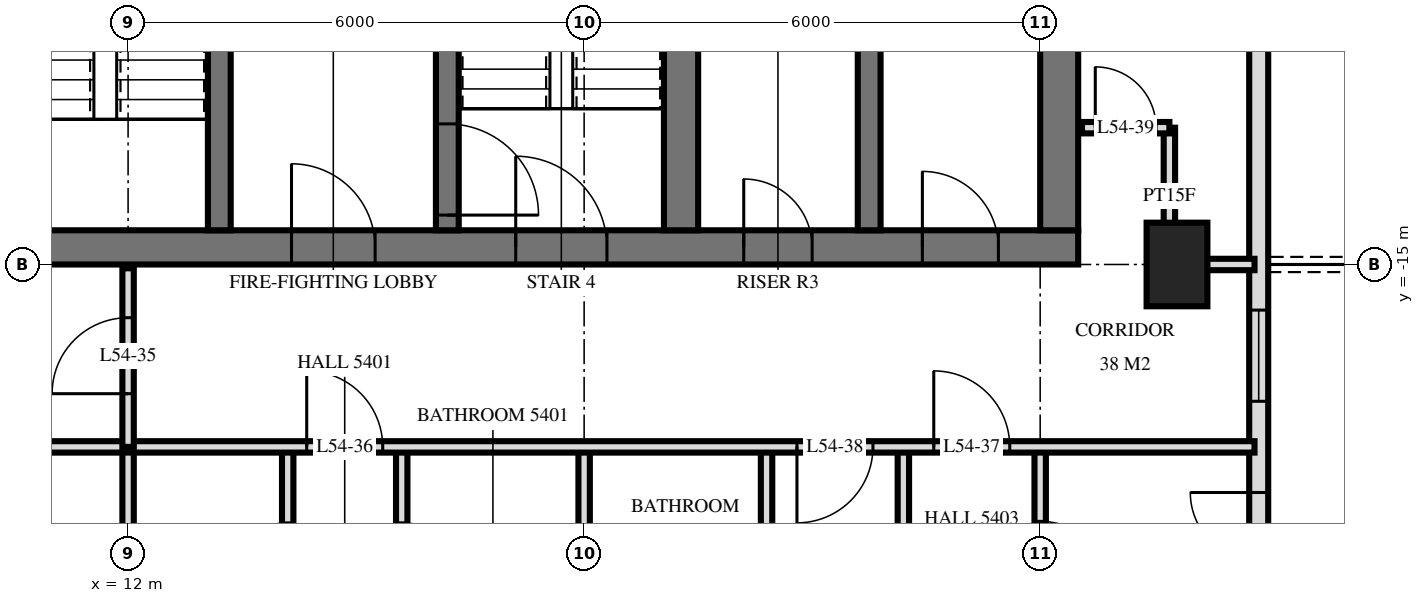
"""IFC4 building model, lengths in metres.
Left out: names, types, materials, properties, quantities, classifications, styles, units other than length and angle.
Written with IfcOpenShell. Run it as: python <this file> out.ifc"""

import sys

from ifc_helpers import new_model, si_unit, direction, frame, frame_2d, origin, origin_2d, place, context, subcontext, project, spatial, rectangle, extrude, element, fill, save


model = new_model("IFC4")
c1 = context("Model", 3, precision=1e-05, world=origin(), true_north=direction((0.0, 1.0)))
c2 = subcontext(c1, "Body", "Model", "MODEL_VIEW")
j1 = project(units=[si_unit("LENGTHUNIT", "METRE"), si_unit("PLANEANGLEUNIT", "RADIAN")], contexts=[c1])
p1 = place(None, origin())
s1 = spatial("IfcSite", under=j1, at=p1, CompositionType="ELEMENT")
p2 = place(p1, origin())
s2 = spatial("IfcBuilding", under=s1, at=p2, CompositionType="ELEMENT")
p3 = place(p2, frame((0.0, 0.0, 208.1)))
s3 = spatial("IfcBuildingStorey", under=s2, at=p3, CompositionType="ELEMENT", Elevation=208.1)
p4 = place(p3, frame((25.8, -15.0, 0.0), z_axis=(0.0, 0.0, 1.0), x_axis=(0.0, 1.0, 0.0)))
e1 = element("IfcColumn", 1, at=p4, inside=s3, PredefinedType="COLUMN", context=c2, shape_type="SweptSolid", body=[
    extrude(rectangle(XDim=1.1, YDim=0.8, at=origin_2d()), origin(), (0.0, 0.0, 1.0), 3.5),
])
p5 = place(p3, frame((10.0, -14.775, 0.0), z_axis=(0.0, 0.0, 1.0), x_axis=(1.0, 0.0, 0.0)))
e2 = element("IfcWall", 2, at=p5, inside=s3, PredefinedType="SHEAR", context=c2, shape_type="SweptSolid", body=[
    extrude(rectangle(XDim=14.5, YDim=0.45, at=frame_2d((7.25, 0.0))), origin(), (0.0, 0.0, 1.0), 3.5),
])
p6 = place(p5, frame((7.1, 0.0, 0.0)))
e3 = element("IfcOpeningElement", 3, at=p6, cuts=e2, PredefinedType="OPENING", context=c2, shape_type="SweptSolid", body=[
    extrude(rectangle(XDim=1.2, YDim=2.1, at=frame_2d((0.6, 1.05))), frame((0.0, 0.235, 0.0), z_axis=(0.0, -1.0, 0.0), x_axis=(1.0, 0.0, 0.0)), (0.0, 0.0, 1.0), 0.47),
])
p7 = place(p5, frame((4.15, 0.0, 0.0)))
e4 = element("IfcOpeningElement", 4, at=p7, cuts=e2, PredefinedType="OPENING", context=c2, shape_type="SweptSolid", body=[
    extrude(rectangle(XDim=1.1, YDim=2.1, at=frame_2d((0.55, 1.05))), frame((0.0, 0.235, 0.0), z_axis=(0.0, -1.0, 0.0), x_axis=(1.0, 0.0, 0.0)), (0.0, 0.0, 1.0), 0.47),
])
p8 = place(p5, frame((10.1, 0.0, 0.0)))
e5 = element("IfcOpeningElement", 5, at=p8, cuts=e2, PredefinedType="OPENING", context=c2, shape_type="SweptSolid", body=[
    extrude(rectangle(XDim=0.9, YDim=2.1, at=frame_2d((0.45, 1.05))), frame((0.0, 0.235, 0.0), z_axis=(0.0, -1.0, 0.0), x_axis=(1.0, 0.0, 0.0)), (0.0, 0.0, 1.0), 0.47),
])
p9 = place(p5, frame((12.45, 0.0, 0.0)))
e6 = element("IfcOpeningElement", 6, at=p9, cuts=e2, PredefinedType="OPENING", context=c2, shape_type="SweptSolid", body=[
    extrude(rectangle(XDim=1.0, YDim=2.1, at=frame_2d((0.5, 1.05))), frame((0.0, 0.235, 0.0), z_axis=(0.0, -1.0, 0.0), x_axis=(1.0, 0.0, 0.0)), (0.0, 0.0, 1.0), 0.47),
])
p10 = place(p3, frame((24.25, -14.55, 0.0), z_axis=(0.0, 0.0, 1.0), x_axis=(0.0, 1.0, 0.0)))
e7 = element("IfcWall", 7, at=p10, inside=s3, PredefinedType="SHEAR", context=c2, shape_type="SweptSolid", body=[
    extrude(rectangle(XDim=14.1, YDim=0.5, at=frame_2d((7.05, 0.0))), origin(), (0.0, 0.0, 1.0), 3.5),
])
p11 = place(p3, frame((13.2, -14.55, 0.0), z_axis=(0.0, 0.0, 1.0), x_axis=(0.0, 1.0, 0.0)))
e8 = element("IfcWall", 8, at=p11, inside=s3, PredefinedType="SHEAR", context=c2, shape_type="SweptSolid", body=[
    extrude(rectangle(XDim=5.4, YDim=0.3, at=frame_2d((2.7, 0.0))), origin(), (0.0, 0.0, 1.0), 3.5),
])
p12 = place(p11, frame((4.0, 0.0, 0.0)))
e9 = element("IfcOpeningElement", 9, at=p12, cuts=e8, PredefinedType="OPENING", context=c2, shape_type="SweptSolid", body=[
    extrude(rectangle(XDim=1.2, YDim=2.1, at=frame_2d((0.6, 1.05))), frame((0.0, 0.16, 0.0), z_axis=(0.0, -1.0, 0.0), x_axis=(1.0, 0.0, 0.0)), (0.0, 0.0, 1.0), 0.32),
])
p13 = place(p3, frame((16.2, -14.55, 0.0), z_axis=(0.0, 0.0, 1.0), x_axis=(0.0, 1.0, 0.0)))
e10 = element("IfcWall", 10, at=p13, inside=s3, PredefinedType="SHEAR", context=c2, shape_type="SweptSolid", body=[
    extrude(rectangle(XDim=5.4, YDim=0.3, at=frame_2d((2.7, 0.0))), origin(), (0.0, 0.0, 1.0), 3.5),
])
p14 = place(p13, frame((0.2, 0.0, 0.0)))
e11 = element("IfcOpeningElement", 11, at=p14, cuts=e10, PredefinedType="OPENING", context=c2, shape_type="SweptSolid", body=[
    extrude(rectangle(XDim=1.2, YDim=2.1, at=frame_2d((0.6, 1.05))), frame((0.0, 0.16, 0.0), z_axis=(0.0, -1.0, 0.0), x_axis=(1.0, 0.0, 0.0)), (0.0, 0.0, 1.0), 0.32),
])
p15 = place(p3, frame((19.275, -14.55, 0.0), z_axis=(0.0, 0.0, 1.0), x_axis=(0.0, 1.0, 0.0)))
e12 = element("IfcWall", 12, at=p15, inside=s3, PredefinedType="SHEAR", context=c2, shape_type="SweptSolid", body=[
    extrude(rectangle(XDim=5.4, YDim=0.45, at=frame_2d((2.7, 0.0))), origin(), (0.0, 0.0, 1.0), 3.5),
])
p16 = place(p3, frame((21.75, -14.55, 0.0), z_axis=(0.0, 0.0, 1.0), x_axis=(0.0, 1.0, 0.0)))
e13 = element("IfcWall", 13, at=p16, inside=s3, PredefinedType="SHEAR", context=c2, shape_type="SweptSolid", body=[
    extrude(rectangle(XDim=5.4, YDim=0.3, at=frame_2d((2.7, 0.0))), origin(), (0.0, 0.0, 1.0), 3.5),
])
p17 = place(p3, frame((26.875, -24.875, 0.0), z_axis=(0.0, 0.0, 1.0), x_axis=(0.0, 1.0, 0.0)))
e14 = element("IfcWall", 14, at=p17, inside=s3, PredefinedType="SOLIDWALL", context=c2, shape_type="SweptSolid", body=[
    extrude(rectangle(XDim=21.551, YDim=0.25, at=frame_2d((10.775, 0.0))), origin(), (0.0, 0.0, 1.0), 3.22),
])
p18 = place(p17, frame((0.575, 0.0, 0.0)))
e15 = element("IfcOpeningElement", 15, at=p18, cuts=e14, PredefinedType="OPENING", context=c2, shape_type="SweptSolid", body=[
    extrude(rectangle(XDim=1.8, YDim=2.4, at=frame_2d((0.9, 1.2))), frame((0.0, 0.135, 0.0), z_axis=(0.0, -1.0, 0.0), x_axis=(1.0, 0.0, 0.0)), (0.0, 0.0, 1.0), 0.27),
])
p19 = place(p17, frame((5.075, 0.0, 0.0)))
e16 = element("IfcOpeningElement", 16, at=p19, cuts=e14, PredefinedType="OPENING", context=c2, shape_type="SweptSolid", body=[
    extrude(rectangle(XDim=1.8, YDim=2.4, at=frame_2d((0.9, 1.2))), frame((0.0, 0.135, 0.0), z_axis=(0.0, -1.0, 0.0), x_axis=(1.0, 0.0, 0.0)), (0.0, 0.0, 1.0), 0.27),
])
p20 = place(p17, frame((8.075, 0.0, 0.9)))
e17 = element("IfcOpeningElement", 17, at=p20, cuts=e14, PredefinedType="OPENING", context=c2, shape_type="SweptSolid", body=[
    extrude(rectangle(XDim=1.2, YDim=1.5, at=frame_2d((0.6, 0.75))), frame((0.0, 0.135, 0.0), z_axis=(0.0, -1.0, 0.0), x_axis=(1.0, 0.0, 0.0)), (0.0, 0.0, 1.0), 0.27),
])
p21 = place(p17, frame((13.1, 0.0, 0.0)))
e18 = element("IfcOpeningElement", 18, at=p21, cuts=e14, PredefinedType="OPENING", context=c2, shape_type="SweptSolid", body=[
    extrude(rectangle(XDim=1.8, YDim=2.4, at=frame_2d((0.9, 1.2))), frame((0.0, 0.135, 0.0), z_axis=(0.0, -1.0, 0.0), x_axis=(1.0, 0.0, 0.0)), (0.0, 0.0, 1.0), 0.27),
])
p22 = place(p3, frame((25.7, -15.0, 0.0), z_axis=(0.0, 0.0, 1.0), x_axis=(0.0, 1.0, 0.0)))
e19 = element("IfcWall", 19, at=p22, inside=s3, PredefinedType="PARTITIONING", context=c2, shape_type="SweptSolid", body=[
    extrude(rectangle(XDim=1.8, YDim=0.15, at=frame_2d((0.9, 0.0))), origin(), (0.0, 0.0, 1.0), 3.22),
])
p23 = place(p3, frame((24.0, -20.4, 0.0), z_axis=(0.0, 0.0, 1.0), x_axis=(0.0, 1.0, 0.0)))
e20 = element("IfcWall", 20, at=p23, inside=s3, PredefinedType="PARTITIONING", context=c2, shape_type="SweptSolid", body=[
    extrude(rectangle(XDim=3.0, YDim=0.15, at=frame_2d((1.5, 0.0))), origin(), (0.0, 0.0, 1.0), 3.22),
])
p24 = place(p23, frame((1.02, 0.0, 0.0)))
e21 = element("IfcOpeningElement", 21, at=p24, cuts=e20, PredefinedType="OPENING", context=c2, shape_type="SweptSolid", body=[
    extrude(rectangle(XDim=1.0, YDim=2.1, at=frame_2d((0.5, 1.05))), frame((0.0, 0.085, 0.0), z_axis=(0.0, -1.0, 0.0), x_axis=(1.0, 0.0, 0.0)), (0.0, 0.0, 1.0), 0.17),
])
for number, where, z_axis, x_axis in (
    (22, (22.2, -20.4, 0.0), (0.0, 0.0, 1.0), (0.0, 1.0, 0.0)),
    (23, (20.4, -20.4, 0.0), (0.0, 0.0, 1.0), (0.0, 1.0, 0.0)),
):
    element("IfcWall", number, at=place(p3, frame(where, z_axis=z_axis, x_axis=x_axis)), inside=s3, PredefinedType="PARTITIONING", context=c2, shape_type="SweptSolid", body=[
        extrude(rectangle(XDim=3.0, YDim=0.15, at=frame_2d((1.5, 0.0))), origin(), (0.0, 0.0, 1.0), 3.22),
    ])
p25 = place(p3, frame((18.0, -29.22, 0.0), z_axis=(0.0, 0.0, 1.0), x_axis=(0.0, 1.0, 0.0)))
e24 = element("IfcWall", 24, at=p25, inside=s3, PredefinedType="PARTITIONING", context=c2, shape_type="SweptSolid", body=[
    extrude(rectangle(XDim=11.82, YDim=0.15, at=frame_2d((5.91, 0.0))), origin(), (0.0, 0.0, 1.0), 3.22),
])
p26 = place(p3, frame((15.6, -20.4, 0.0), z_axis=(0.0, 0.0, 1.0), x_axis=(0.0, 1.0, 0.0)))
e25 = element("IfcWall", 25, at=p26, inside=s3, PredefinedType="PARTITIONING", context=c2, shape_type="SweptSolid", body=[
    extrude(rectangle(XDim=3.0, YDim=0.15, at=frame_2d((1.5, 0.0))), origin(), (0.0, 0.0, 1.0), 3.22),
])
p27 = place(p26, frame((1.0, 0.0, 0.0)))
e26 = element("IfcOpeningElement", 26, at=p27, cuts=e25, PredefinedType="OPENING", context=c2, shape_type="SweptSolid", body=[
    extrude(rectangle(XDim=1.0, YDim=2.1, at=frame_2d((0.5, 1.05))), frame((0.0, 0.085, 0.0), z_axis=(0.0, -1.0, 0.0), x_axis=(1.0, 0.0, 0.0)), (0.0, 0.0, 1.0), 0.17),
])
p28 = place(p3, frame((14.1, -20.4, 0.0), z_axis=(0.0, 0.0, 1.0), x_axis=(0.0, 1.0, 0.0)))
e27 = element("IfcWall", 27, at=p28, inside=s3, PredefinedType="PARTITIONING", context=c2, shape_type="SweptSolid", body=[
    extrude(rectangle(XDim=3.0, YDim=0.15, at=frame_2d((1.5, 0.0))), origin(), (0.0, 0.0, 1.0), 3.22),
])
p29 = place(p28, frame((1.0, 0.0, 0.0)))
e28 = element("IfcOpeningElement", 28, at=p29, cuts=e27, PredefinedType="OPENING", context=c2, shape_type="SweptSolid", body=[
    extrude(rectangle(XDim=1.0, YDim=2.1, at=frame_2d((0.5, 1.05))), frame((0.0, 0.085, 0.0), z_axis=(0.0, -1.0, 0.0), x_axis=(1.0, 0.0, 0.0)), (0.0, 0.0, 1.0), 0.17),
])
p30 = place(p3, frame((12.0, -17.4, 0.0), z_axis=(0.0, 0.0, 1.0), x_axis=(0.0, 1.0, 0.0)))
e29 = element("IfcWall", 29, at=p30, inside=s3, PredefinedType="PARTITIONING", context=c2, shape_type="SweptSolid", body=[
    extrude(rectangle(XDim=2.35, YDim=0.15, at=frame_2d((1.175, 0.0))), origin(), (0.0, 0.0, 1.0), 3.22),
])
p31 = place(p30, frame((0.7, 0.0, 0.0)))
e30 = element("IfcOpeningElement", 30, at=p31, cuts=e29, PredefinedType="OPENING", context=c2, shape_type="SweptSolid", body=[
    extrude(rectangle(XDim=1.0, YDim=2.1, at=frame_2d((0.5, 1.05))), frame((0.0, 0.085, 0.0), z_axis=(0.0, -1.0, 0.0), x_axis=(1.0, 0.0, 0.0)), (0.0, 0.0, 1.0), 0.17),
])
p32 = place(p3, frame((12.0, -29.22, 0.0), z_axis=(0.0, 0.0, 1.0), x_axis=(0.0, 1.0, 0.0)))
e31 = element("IfcWall", 31, at=p32, inside=s3, PredefinedType="PARTITIONING", context=c2, shape_type="SweptSolid", body=[
    extrude(rectangle(XDim=11.82, YDim=0.15, at=frame_2d((5.91, 0.0))), origin(), (0.0, 0.0, 1.0), 3.22),
])
p33 = place(p3, frame((-26.82, -17.4, 0.0), z_axis=(0.0, 0.0, 1.0), x_axis=(1.0, 0.0, 0.0)))
e32 = element("IfcWall", 32, at=p33, inside=s3, PredefinedType="PARTITIONING", context=c2, shape_type="SweptSolid", body=[
    extrude(rectangle(XDim=53.64, YDim=0.15, at=frame_2d((26.82, 0.0))), origin(), (0.0, 0.0, 1.0), 3.22),
])
p34 = place(p33, frame((4.92, 0.0, 0.0)))
e33 = element("IfcOpeningElement", 33, at=p34, cuts=e32, PredefinedType="OPENING", context=c2, shape_type="SweptSolid", body=[
    extrude(rectangle(XDim=1.0, YDim=2.1, at=frame_2d((0.5, 1.05))), frame((0.0, 0.085, 0.0), z_axis=(0.0, -1.0, 0.0), x_axis=(1.0, 0.0, 0.0)), (0.0, 0.0, 1.0), 0.17),
])
p35 = place(p33, frame((1.62, 0.0, 0.0)))
e34 = element("IfcOpeningElement", 34, at=p35, cuts=e32, PredefinedType="OPENING", context=c2, shape_type="SweptSolid", body=[
    extrude(rectangle(XDim=1.0, YDim=2.1, at=frame_2d((0.5, 1.05))), frame((0.0, 0.085, 0.0), z_axis=(0.0, -1.0, 0.0), x_axis=(1.0, 0.0, 0.0)), (0.0, 0.0, 1.0), 0.17),
])
p36 = place(p33, frame((41.17, 0.0, 0.0)))
e35 = element("IfcOpeningElement", 35, at=p36, cuts=e32, PredefinedType="OPENING", context=c2, shape_type="SweptSolid", body=[
    extrude(rectangle(XDim=1.0, YDim=2.1, at=frame_2d((0.5, 1.05))), frame((0.0, 0.085, 0.0), z_axis=(0.0, -1.0, 0.0), x_axis=(1.0, 0.0, 0.0)), (0.0, 0.0, 1.0), 0.17),
])
p37 = place(p33, frame((49.42, 0.0, 0.0)))
e36 = element("IfcOpeningElement", 36, at=p37, cuts=e32, PredefinedType="OPENING", context=c2, shape_type="SweptSolid", body=[
    extrude(rectangle(XDim=1.0, YDim=2.1, at=frame_2d((0.5, 1.05))), frame((0.0, 0.085, 0.0), z_axis=(0.0, -1.0, 0.0), x_axis=(1.0, 0.0, 0.0)), (0.0, 0.0, 1.0), 0.17),
])
p38 = place(p33, frame((47.62, 0.0, 0.0)))
e37 = element("IfcOpeningElement", 37, at=p38, cuts=e32, PredefinedType="OPENING", context=c2, shape_type="SweptSolid", body=[
    extrude(rectangle(XDim=1.0, YDim=2.1, at=frame_2d((0.5, 1.05))), frame((0.0, 0.085, 0.0), z_axis=(0.0, -1.0, 0.0), x_axis=(1.0, 0.0, 0.0)), (0.0, 0.0, 1.0), 0.17),
])
p39 = place(p33, frame((21.82, 0.0, 0.0)))
e38 = element("IfcOpeningElement", 38, at=p39, cuts=e32, PredefinedType="OPENING", context=c2, shape_type="SweptSolid", body=[
    extrude(rectangle(XDim=1.0, YDim=2.1, at=frame_2d((0.5, 1.05))), frame((0.0, 0.085, 0.0), z_axis=(0.0, -1.0, 0.0), x_axis=(1.0, 0.0, 0.0)), (0.0, 0.0, 1.0), 0.17),
])
p40 = place(p33, frame((33.82, 0.0, 0.0)))
e39 = element("IfcOpeningElement", 39, at=p40, cuts=e32, PredefinedType="OPENING", context=c2, shape_type="SweptSolid", body=[
    extrude(rectangle(XDim=1.0, YDim=2.1, at=frame_2d((0.5, 1.05))), frame((0.0, 0.085, 0.0), z_axis=(0.0, -1.0, 0.0), x_axis=(1.0, 0.0, 0.0)), (0.0, 0.0, 1.0), 0.17),
])
p41 = place(p3, frame((25.7, -15.0, 0.0), z_axis=(0.0, 0.0, 1.0), x_axis=(1.0, 0.0, 0.0)))
e40 = element("IfcWall", 40, at=p41, inside=s3, PredefinedType="PARTITIONING", context=c2, shape_type="SweptSolid", body=[
    extrude(rectangle(XDim=1.12, YDim=0.15, at=frame_2d((0.56, 0.0))), origin(), (0.0, 0.0, 1.0), 3.22),
])
p42 = place(p3, frame((24.55, -13.2, 0.0), z_axis=(0.0, 0.0, 1.0), x_axis=(1.0, 0.0, 0.0)))
e41 = element("IfcWall", 41, at=p42, inside=s3, PredefinedType="PARTITIONING", context=c2, shape_type="SweptSolid", body=[
    extrude(rectangle(XDim=1.15, YDim=0.15, at=frame_2d((0.575, 0.0))), origin(), (0.0, 0.0, 1.0), 3.22),
])
p43 = place(p42, frame((0.175, 0.0, 0.0)))
e42 = element("IfcOpeningElement", 42, at=p43, cuts=e41, PredefinedType="OPENING", context=c2, shape_type="SweptSolid", body=[
    extrude(rectangle(XDim=0.8, YDim=2.1, at=frame_2d((0.4, 1.05))), frame((0.0, 0.085, 0.0), z_axis=(0.0, -1.0, 0.0), x_axis=(1.0, 0.0, 0.0)), (0.0, 0.0, 1.0), 0.17),
])
p44 = place(p19, origin())
e43 = element("IfcDoor", 43, at=p44, inside=s3, OperationType="DOUBLE_DOOR_SINGLE_SWING", PredefinedType="DOOR", context=c2, shape_type="SweptSolid", body=[
    extrude(rectangle(XDim=1.8, YDim=2.4, at=frame_2d((0.9, 1.2))), frame((0.0, 0.025, 0.0), z_axis=(0.0, -1.0, 0.0), x_axis=(1.0, 0.0, 0.0)), (0.0, 0.0, 1.0), 0.05),
])
fill(e16, e43)
p45 = place(p20, origin())
e44 = element("IfcWindow", 44, at=p45, inside=s3, PartitioningType="SINGLE_PANEL", PredefinedType="WINDOW", context=c2, shape_type="SweptSolid", body=[
    extrude(rectangle(XDim=1.2, YDim=1.5, at=frame_2d((0.6, 0.75))), frame((0.0, 0.03, 0.0), z_axis=(0.0, -1.0, 0.0), x_axis=(1.0, 0.0, 0.0)), (0.0, 0.0, 1.0), 0.06),
])
fill(e17, e44)
p46 = place(p6, origin())
e45 = element("IfcDoor", 45, at=p46, inside=s3, OperationType="SINGLE_SWING_RIGHT", PredefinedType="DOOR", context=c2, shape_type="SweptSolid", body=[
    extrude(rectangle(XDim=1.2, YDim=2.1, at=frame_2d((0.6, 1.05))), frame((0.0, 0.025, 0.0), z_axis=(0.0, -1.0, 0.0), x_axis=(1.0, 0.0, 0.0)), (0.0, 0.0, 1.0), 0.05),
])
fill(e3, e45)
p47 = place(p7, origin())
e46 = element("IfcDoor", 46, at=p47, inside=s3, OperationType="SINGLE_SWING_RIGHT", PredefinedType="DOOR", context=c2, shape_type="SweptSolid", body=[
    extrude(rectangle(XDim=1.1, YDim=2.1, at=frame_2d((0.55, 1.05))), frame((0.0, 0.025, 0.0), z_axis=(0.0, -1.0, 0.0), x_axis=(1.0, 0.0, 0.0)), (0.0, 0.0, 1.0), 0.05),
])
fill(e4, e46)
p48 = place(p8, origin())
e47 = element("IfcDoor", 47, at=p48, inside=s3, OperationType="SINGLE_SWING_RIGHT", PredefinedType="DOOR", context=c2, shape_type="SweptSolid", body=[
    extrude(rectangle(XDim=0.9, YDim=2.1, at=frame_2d((0.45, 1.05))), frame((0.0, 0.025, 0.0), z_axis=(0.0, -1.0, 0.0), x_axis=(1.0, 0.0, 0.0)), (0.0, 0.0, 1.0), 0.05),
])
fill(e5, e47)
p49 = place(p9, origin())
e48 = element("IfcDoor", 48, at=p49, inside=s3, OperationType="SINGLE_SWING_RIGHT", PredefinedType="DOOR", context=c2, shape_type="SweptSolid", body=[
    extrude(rectangle(XDim=1.0, YDim=2.1, at=frame_2d((0.5, 1.05))), frame((0.0, 0.025, 0.0), z_axis=(0.0, -1.0, 0.0), x_axis=(1.0, 0.0, 0.0)), (0.0, 0.0, 1.0), 0.05),
])
fill(e6, e48)
p50 = place(p14, frame((0.6, 0.0, 0.0), z_axis=(0.0, 0.0, 1.0), x_axis=(-1.0, 0.0, 0.0)))
e49 = element("IfcDoor", 49, at=p50, inside=s3, OperationType="SINGLE_SWING_LEFT", PredefinedType="DOOR", context=c2, shape_type="SweptSolid", body=[
    extrude(rectangle(XDim=1.2, YDim=2.1, at=frame_2d((0.0, 1.05))), frame((0.0, -0.025, 0.0), z_axis=(0.0, 1.0, 0.0), x_axis=(-1.0, 0.0, 0.0)), (0.0, 0.0, 1.0), 0.05),
])
fill(e11, e49)
p51 = place(p31, origin())
e50 = element("IfcDoor", 50, at=p51, inside=s3, OperationType="SINGLE_SWING_RIGHT", PredefinedType="DOOR", context=c2, shape_type="SweptSolid", body=[
    extrude(rectangle(XDim=1.0, YDim=2.1, at=frame_2d((0.5, 1.05))), frame((0.0, 0.025, 0.0), z_axis=(0.0, -1.0, 0.0), x_axis=(1.0, 0.0, 0.0)), (0.0, 0.0, 1.0), 0.05),
])
fill(e30, e50)
p52 = place(p36, origin())
e51 = element("IfcDoor", 51, at=p52, inside=s3, OperationType="SINGLE_SWING_RIGHT", PredefinedType="DOOR", context=c2, shape_type="SweptSolid", body=[
    extrude(rectangle(XDim=1.0, YDim=2.1, at=frame_2d((0.5, 1.05))), frame((0.0, 0.025, 0.0), z_axis=(0.0, -1.0, 0.0), x_axis=(1.0, 0.0, 0.0)), (0.0, 0.0, 1.0), 0.05),
])
fill(e35, e51)
p53 = place(p37, origin())
e52 = element("IfcDoor", 52, at=p53, inside=s3, OperationType="SINGLE_SWING_RIGHT", PredefinedType="DOOR", context=c2, shape_type="SweptSolid", body=[
    extrude(rectangle(XDim=1.0, YDim=2.1, at=frame_2d((0.5, 1.05))), frame((0.0, 0.025, 0.0), z_axis=(0.0, -1.0, 0.0), x_axis=(1.0, 0.0, 0.0)), (0.0, 0.0, 1.0), 0.05),
])
fill(e36, e52)
p54 = place(p38, frame((0.5, 0.0, 0.0), z_axis=(0.0, 0.0, 1.0), x_axis=(-1.0, 0.0, 0.0)))
e53 = element("IfcDoor", 53, at=p54, inside=s3, OperationType="SINGLE_SWING_LEFT", PredefinedType="DOOR", context=c2, shape_type="SweptSolid", body=[
    extrude(rectangle(XDim=1.0, YDim=2.1, at=frame_2d((0.0, 1.05))), frame((0.0, -0.025, 0.0), z_axis=(0.0, 1.0, 0.0), x_axis=(-1.0, 0.0, 0.0)), (0.0, 0.0, 1.0), 0.05),
])
fill(e37, e53)
p55 = place(p43, origin())
e54 = element("IfcDoor", 54, at=p55, inside=s3, OperationType="SINGLE_SWING_RIGHT", PredefinedType="DOOR", context=c2, shape_type="SweptSolid", body=[
    extrude(rectangle(XDim=0.8, YDim=2.1, at=frame_2d((0.4, 1.05))), frame((0.0, 0.025, 0.0), z_axis=(0.0, -1.0, 0.0), x_axis=(1.0, 0.0, 0.0)), (0.0, 0.0, 1.0), 0.05),
])
fill(e42, e54)
p56 = place(p24, frame((0.5, 0.0, 0.0), z_axis=(0.0, 0.0, 1.0), x_axis=(-1.0, 0.0, 0.0)))
e55 = element("IfcDoor", 55, at=p56, inside=s3, OperationType="SINGLE_SWING_LEFT", PredefinedType="DOOR", context=c2, shape_type="SweptSolid", body=[
    extrude(rectangle(XDim=1.0, YDim=2.1, at=frame_2d((0.0, 1.05))), frame((0.0, -0.025, 0.0), z_axis=(0.0, 1.0, 0.0), x_axis=(-1.0, 0.0, 0.0)), (0.0, 0.0, 1.0), 0.05),
])
fill(e21, e55)
save(model, sys.argv[1])
